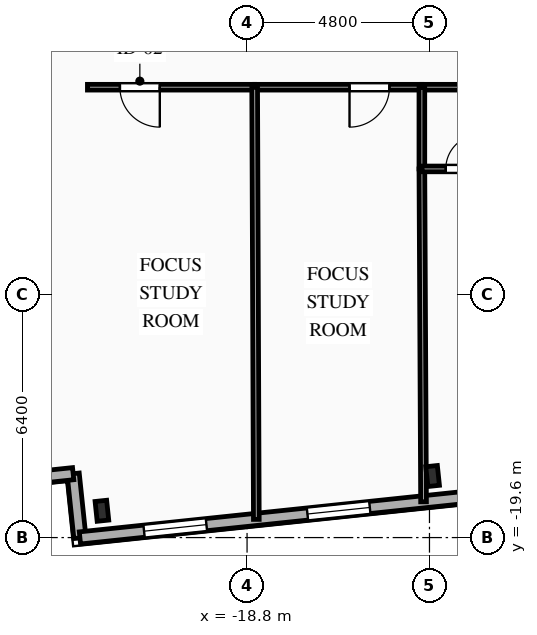
"""IFC4 building model, lengths in metres.
Left out: names, types, materials, properties, quantities, classifications, styles, units other than length and angle.
Written with IfcOpenShell. Run it as: python <this file> out.ifc"""

import sys

from ifc_helpers import new_model, si_unit, direction, frame, frame_2d, origin, origin_2d, place, context, subcontext, project, spatial, rectangle, i_section, extrude, element, fill, save


model = new_model("IFC4")
c1 = context("Model", 3, precision=1e-05, world=origin(), true_north=direction((0.0, 1.0)))
c2 = subcontext(c1, "Body", "Model", "MODEL_VIEW")
j1 = project(units=[si_unit("LENGTHUNIT", "METRE"), si_unit("PLANEANGLEUNIT", "RADIAN")], contexts=[c1])
p1 = place(None, origin())
s1 = spatial("IfcSite", under=j1, at=p1, CompositionType="ELEMENT")
p2 = place(p1, origin())
s2 = spatial("IfcBuilding", under=s1, at=p2, CompositionType="ELEMENT")
p3 = place(p2, frame((0.0, 0.0, 85.7)))
s3 = spatial("IfcBuildingStorey", under=s2, at=p3, CompositionType="ELEMENT", Elevation=85.7)
for number, where, z_axis, x_axis in (
    (1, (-22.619, -18.895, 0.0), (0.0, 0.0, 1.0), (0.995, 0.105, 0.0)),
    (2, (-13.917, -17.98, 0.0), (0.0, 0.0, 1.0), (0.995, 0.105, 0.0)),
):
    element("IfcColumn", number, at=place(p3, frame(where, z_axis=z_axis, x_axis=x_axis)), inside=s3, PredefinedType="COLUMN", context=c2, shape_type="SweptSolid", body=[
        extrude(i_section(OverallWidth=0.306, OverallDepth=0.524, WebThickness=0.021, FlangeThickness=0.04, FilletRadius=0.027, at=origin_2d()), origin(), (0.0, 0.0, 1.0), 3.35),
    ])
for number, where, z_axis, x_axis in (
    (3, (-23.198, -19.609, 0.0), (0.0, 0.0, 1.0), (-0.105, 0.995, 0.0)),
    (4, (-23.376, -17.919, 0.0), (0.0, 0.0, 1.0), (-0.995, -0.105, 0.0)),
):
    element("IfcWall", number, at=place(p3, frame(where, z_axis=z_axis, x_axis=x_axis)), inside=s3, PredefinedType="SOLIDWALL", context=c2, shape_type="SweptSolid", body=[
        extrude(rectangle(XDim=1.7, YDim=0.32, at=frame_2d((0.85, 0.0))), origin(), (0.0, 0.0, 1.0), 3.045),
    ])
p4 = place(p3, frame((30.307, -13.986, 0.0), z_axis=(0.0, 0.0, 1.0), x_axis=(-0.994521628355, -0.104531003701, 0.0)))
e5 = element("IfcWall", 5, at=p4, inside=s3, PredefinedType="SOLIDWALL", context=c2, shape_type="SweptSolid", body=[
    extrude(rectangle(XDim=53.8, YDim=0.32, at=frame_2d((26.9, 0.0))), origin(), (0.0, 0.0, 1.0), 3.045),
])
p5 = place(p4, frame((11.344, 0.0, 0.85)))
e6 = element("IfcOpeningElement", 6, at=p5, cuts=e5, PredefinedType="OPENING", context=c2, shape_type="SweptSolid", body=[
    extrude(rectangle(XDim=1.65, YDim=1.85, at=frame_2d((0.825, 0.925))), frame((0.0, 0.17, 0.0), z_axis=(0.0, -1.0, 0.0), x_axis=(1.0, 0.0, 0.0)), (0.0, 0.0, 1.0), 0.34),
])
p6 = place(p4, frame((20.516, 0.0, 0.85)))
e7 = element("IfcOpeningElement", 7, at=p6, cuts=e5, PredefinedType="OPENING", context=c2, shape_type="SweptSolid", body=[
    extrude(rectangle(XDim=2.2, YDim=1.85, at=frame_2d((1.1, 0.925))), frame((0.0, 0.17, 0.0), z_axis=(0.0, -1.0, 0.0), x_axis=(1.0, 0.0, 0.0)), (0.0, 0.0, 1.0), 0.34),
])
p7 = place(p4, frame((29.763, 0.0, 0.85)))
e8 = element("IfcOpeningElement", 8, at=p7, cuts=e5, PredefinedType="OPENING", context=c2, shape_type="SweptSolid", body=[
    extrude(rectangle(XDim=2.2, YDim=1.85, at=frame_2d((1.1, 0.925))), frame((0.0, 0.17, 0.0), z_axis=(0.0, -1.0, 0.0), x_axis=(1.0, 0.0, 0.0)), (0.0, 0.0, 1.0), 0.34),
])
p8 = place(p4, frame((39.01, 0.0, 0.85)))
e9 = element("IfcOpeningElement", 9, at=p8, cuts=e5, PredefinedType="OPENING", context=c2, shape_type="SweptSolid", body=[
    extrude(rectangle(XDim=2.2, YDim=1.85, at=frame_2d((1.1, 0.925))), frame((0.0, 0.17, 0.0), z_axis=(0.0, -1.0, 0.0), x_axis=(1.0, 0.0, 0.0)), (0.0, 0.0, 1.0), 0.34),
])
p9 = place(p4, frame((46.13, 0.0, 0.85)))
e10 = element("IfcOpeningElement", 10, at=p9, cuts=e5, PredefinedType="OPENING", context=c2, shape_type="SweptSolid", body=[
    extrude(rectangle(XDim=1.65, YDim=1.85, at=frame_2d((0.825, 0.925))), frame((0.0, 0.17, 0.0), z_axis=(0.0, -1.0, 0.0), x_axis=(1.0, 0.0, 0.0)), (0.0, 0.0, 1.0), 0.34),
])
p10 = place(p4, frame((50.453, 0.0, 0.85)))
e11 = element("IfcOpeningElement", 11, at=p10, cuts=e5, PredefinedType="OPENING", context=c2, shape_type="SweptSolid", body=[
    extrude(rectangle(XDim=1.65, YDim=1.85, at=frame_2d((0.825, 0.925))), frame((0.0, 0.17, 0.0), z_axis=(0.0, -1.0, 0.0), x_axis=(1.0, 0.0, 0.0)), (0.0, 0.0, 1.0), 0.34),
])
p11 = place(p3, frame((-18.6, -7.75, 0.0), z_axis=(0.0, 0.0, 1.0), x_axis=(-1.0, 0.0, 0.0)))
e12 = element("IfcWall", 12, at=p11, inside=s3, PredefinedType="PARTITIONING", context=c2, shape_type="SweptSolid", body=[
    extrude(rectangle(XDim=4.4, YDim=0.15, at=frame_2d((2.2, 0.0))), origin(), (0.0, 0.0, 1.0), 3.045),
])
p12 = place(p11, frame((2.496, 0.0, 0.0)))
e13 = element("IfcOpeningElement", 13, at=p12, cuts=e12, PredefinedType="OPENING", context=c2, shape_type="SweptSolid", body=[
    extrude(rectangle(XDim=1.05, YDim=2.15, at=frame_2d((0.525, 1.075))), frame((0.0, 0.085, 0.0), z_axis=(0.0, -1.0, 0.0), x_axis=(1.0, 0.0, 0.0)), (0.0, 0.0, 1.0), 0.17),
])
p13 = place(p3, frame((-14.2, -7.75, 0.0), z_axis=(0.0, 0.0, 1.0), x_axis=(-1.0, 0.0, 0.0)))
e14 = element("IfcWall", 14, at=p13, inside=s3, PredefinedType="PARTITIONING", context=c2, shape_type="SweptSolid", body=[
    extrude(rectangle(XDim=4.4, YDim=0.15, at=frame_2d((2.2, 0.0))), origin(), (0.0, 0.0, 1.0), 3.045),
])
p14 = place(p13, frame((0.854, 0.0, 0.0)))
e15 = element("IfcOpeningElement", 15, at=p14, cuts=e14, PredefinedType="OPENING", context=c2, shape_type="SweptSolid", body=[
    extrude(rectangle(XDim=1.05, YDim=2.15, at=frame_2d((0.525, 1.075))), frame((0.0, 0.085, 0.0), z_axis=(0.0, -1.0, 0.0), x_axis=(1.0, 0.0, 0.0)), (0.0, 0.0, 1.0), 0.17),
])
p15 = place(p3, frame((-11.75, -7.75, 0.0), z_axis=(0.0, 0.0, 1.0), x_axis=(-1.0, 0.0, 0.0)))
e16 = element("IfcWall", 16, at=p15, inside=s3, PredefinedType="PLUMBINGWALL", context=c2, shape_type="SweptSolid", body=[
    extrude(rectangle(XDim=2.45, YDim=0.15, at=frame_2d((1.225, 0.0))), origin(), (0.0, 0.0, 1.0), 3.045),
])
p16 = place(p3, frame((-18.6, -7.75, 0.0), z_axis=(0.0, 0.0, 1.0), x_axis=(0.003864456523, -0.99999253296, 0.0)))
e17 = element("IfcWall", 17, at=p16, inside=s3, PredefinedType="PARTITIONING", context=c2, shape_type="SweptSolid", body=[
    extrude(rectangle(XDim=11.372, YDim=0.15, at=frame_2d((5.686, 0.0))), origin(), (0.0, 0.0, 1.0), 3.045),
])
p17 = place(p3, frame((-14.2, -9.9, 0.0), z_axis=(0.0, 0.0, 1.0), x_axis=(0.005017078758, -0.999987414381, 0.0)))
e18 = element("IfcWall", 18, at=p17, inside=s3, PredefinedType="PARTITIONING", context=c2, shape_type="SweptSolid", body=[
    extrude(rectangle(XDim=8.759, YDim=0.15, at=frame_2d((4.379, 0.0))), origin(), (0.0, 0.0, 1.0), 3.045),
])
p18 = place(p3, frame((-14.2, -7.75, 0.0), z_axis=(0.0, 0.0, 1.0), x_axis=(0.0, -1.0, 0.0)))
e19 = element("IfcWall", 19, at=p18, inside=s3, PredefinedType="PLUMBINGWALL", context=c2, shape_type="SweptSolid", body=[
    extrude(rectangle(XDim=2.15, YDim=0.15, at=frame_2d((1.075, 0.0))), origin(), (0.0, 0.0, 1.0), 3.045),
])
p19 = place(p3, frame((-14.2, -9.9, 0.0), z_axis=(0.0, 0.0, 1.0), x_axis=(1.0, 0.0, 0.0)))
e20 = element("IfcWall", 20, at=p19, inside=s3, PredefinedType="PLUMBINGWALL", context=c2, shape_type="SweptSolid", body=[
    extrude(rectangle(XDim=2.45, YDim=0.15, at=frame_2d((1.225, 0.0))), origin(), (0.0, 0.0, 1.0), 3.045),
])
p20 = place(p19, frame((0.629, 0.0, 0.0)))
e21 = element("IfcOpeningElement", 21, at=p20, cuts=e20, PredefinedType="OPENING", context=c2, shape_type="SweptSolid", body=[
    extrude(rectangle(XDim=0.9, YDim=2.1, at=frame_2d((0.45, 1.05))), frame((0.0, 0.085, 0.0), z_axis=(0.0, -1.0, 0.0), x_axis=(1.0, 0.0, 0.0)), (0.0, 0.0, 1.0), 0.17),
])
p21 = place(p9, origin())
e22 = element("IfcWindow", 22, at=p21, inside=s3, PartitioningType="SINGLE_PANEL", PredefinedType="WINDOW", context=c2, shape_type="SweptSolid", body=[
    extrude(rectangle(XDim=1.65, YDim=1.85, at=frame_2d((0.825, 0.925))), frame((0.0, 0.03, 0.0), z_axis=(0.0, -1.0, 0.0), x_axis=(1.0, 0.0, 0.0)), (0.0, 0.0, 1.0), 0.06),
])
fill(e10, e22)
p22 = place(p10, origin())
e23 = element("IfcWindow", 23, at=p22, inside=s3, PartitioningType="SINGLE_PANEL", PredefinedType="WINDOW", context=c2, shape_type="SweptSolid", body=[
    extrude(rectangle(XDim=1.65, YDim=1.85, at=frame_2d((0.825, 0.925))), frame((0.0, 0.03, 0.0), z_axis=(0.0, -1.0, 0.0), x_axis=(1.0, 0.0, 0.0)), (0.0, 0.0, 1.0), 0.06),
])
fill(e11, e23)
p23 = place(p12, origin())
e24 = element("IfcDoor", 24, at=p23, inside=s3, OperationType="SINGLE_SWING_LEFT", PredefinedType="DOOR", context=c2, shape_type="SweptSolid", body=[
    extrude(rectangle(XDim=1.05, YDim=2.15, at=frame_2d((0.525, 1.075))), frame((0.0, 0.025, 0.0), z_axis=(0.0, -1.0, 0.0), x_axis=(1.0, 0.0, 0.0)), (0.0, 0.0, 1.0), 0.05),
])
fill(e13, e24)
p24 = place(p14, origin())
e25 = element("IfcDoor", 25, at=p24, inside=s3, OperationType="SINGLE_SWING_RIGHT", PredefinedType="DOOR", context=c2, shape_type="SweptSolid", body=[
    extrude(rectangle(XDim=1.05, YDim=2.15, at=frame_2d((0.525, 1.075))), frame((0.0, 0.025, 0.0), z_axis=(0.0, -1.0, 0.0), x_axis=(1.0, 0.0, 0.0)), (0.0, 0.0, 1.0), 0.05),
])
fill(e15, e25)
p25 = place(p20, origin())
e26 = element("IfcDoor", 26, at=p25, inside=s3, OperationType="SINGLE_SWING_RIGHT", PredefinedType="DOOR", context=c2, shape_type="SweptSolid", body=[
    extrude(rectangle(XDim=0.9, YDim=2.1, at=frame_2d((0.45, 1.05))), frame((0.0, 0.025, 0.0), z_axis=(0.0, -1.0, 0.0), x_axis=(1.0, 0.0, 0.0)), (0.0, 0.0, 1.0), 0.05),
])
fill(e21, e26)
save(model, sys.argv[1])
